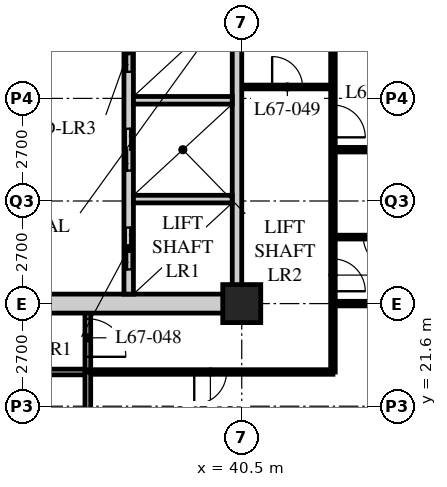
"""IFC4 building model, lengths in metres.
Left out: names, types, materials, properties, quantities, classifications, styles, units other than length and angle.
Written with IfcOpenShell. Run it as: python <this file> out.ifc"""

import sys

from ifc_helpers import new_model, si_unit, direction, frame, frame_2d, origin, origin_2d, place, context, subcontext, project, spatial, rectangle, hollow_rectangle, extrude, element, fill, save


model = new_model("IFC4")
c1 = context("Model", 3, precision=1e-05, world=origin(), true_north=direction((0.0, 1.0)))
c2 = subcontext(c1, "Body", "Model", "MODEL_VIEW")
j1 = project(units=[si_unit("LENGTHUNIT", "METRE"), si_unit("PLANEANGLEUNIT", "RADIAN")], contexts=[c1])
p1 = place(None, origin())
s1 = spatial("IfcSite", under=j1, at=p1, CompositionType="ELEMENT")
p2 = place(p1, origin())
s2 = spatial("IfcBuilding", under=s1, at=p2, CompositionType="ELEMENT")
p3 = place(p2, frame((0.0, 0.0, 261.9)))
s3 = spatial("IfcBuildingStorey", under=s2, at=p3, CompositionType="ELEMENT", Elevation=261.9)
p4 = place(p3, frame((40.5, 24.3, 0.0), z_axis=(0.0, 0.0, 1.0), x_axis=(1.0, 0.0, 0.0)))
e1 = element("IfcColumn", 1, at=p4, inside=s3, PredefinedType="COLUMN", context=c2, shape_type="SweptSolid", body=[
    extrude(hollow_rectangle(XDim=1.0, YDim=1.0, WallThickness=0.1, at=origin_2d()), origin(), (0.0, 0.0, 1.0), 3.9),
])
p5 = place(p3, frame((8.1, 22.5, 0.0), z_axis=(0.0, 0.0, 1.0), x_axis=(1.0, 0.0, 0.0)))
e2 = element("IfcWall", 2, at=p5, inside=s3, PredefinedType="PARTITIONING", context=c2, shape_type="SweptSolid", body=[
    extrude(rectangle(XDim=28.35, YDim=0.15, at=frame_2d((14.175, 0.0))), origin(), (0.0, 0.0, 1.0), 3.69),
])
p6 = place(p5, frame((4.45, 0.0, 0.0)))
e3 = element("IfcOpeningElement", 3, at=p6, cuts=e2, PredefinedType="OPENING", context=c2, shape_type="SweptSolid", body=[
    extrude(rectangle(XDim=1.0, YDim=2.1, at=frame_2d((0.5, 1.05))), frame((0.0, 0.085, 0.0), z_axis=(0.0, -1.0, 0.0), x_axis=(1.0, 0.0, 0.0)), (0.0, 0.0, 1.0), 0.17),
])
p7 = place(p5, frame((12.55, 0.0, 0.0)))
e4 = element("IfcOpeningElement", 4, at=p7, cuts=e2, PredefinedType="OPENING", context=c2, shape_type="SweptSolid", body=[
    extrude(rectangle(XDim=1.0, YDim=2.1, at=frame_2d((0.5, 1.05))), frame((0.0, 0.085, 0.0), z_axis=(0.0, -1.0, 0.0), x_axis=(1.0, 0.0, 0.0)), (0.0, 0.0, 1.0), 0.17),
])
p8 = place(p5, frame((20.65, 0.0, 0.0)))
e5 = element("IfcOpeningElement", 5, at=p8, cuts=e2, PredefinedType="OPENING", context=c2, shape_type="SweptSolid", body=[
    extrude(rectangle(XDim=1.0, YDim=2.1, at=frame_2d((0.5, 1.05))), frame((0.0, 0.085, 0.0), z_axis=(0.0, -1.0, 0.0), x_axis=(1.0, 0.0, 0.0)), (0.0, 0.0, 1.0), 0.17),
])
p9 = place(p5, frame((2.625, 0.0, 0.0)))
e6 = element("IfcOpeningElement", 6, at=p9, cuts=e2, PredefinedType="OPENING", context=c2, shape_type="SweptSolid", body=[
    extrude(rectangle(XDim=1.0, YDim=2.1, at=frame_2d((0.5, 1.05))), frame((0.0, 0.085, 0.0), z_axis=(0.0, -1.0, 0.0), x_axis=(1.0, 0.0, 0.0)), (0.0, 0.0, 1.0), 0.17),
])
p10 = place(p3, frame((36.45, 22.5, 0.0), z_axis=(0.0, 0.0, 1.0), x_axis=(0.0, 1.0, 0.0)))
e7 = element("IfcWall", 7, at=p10, inside=s3, PredefinedType="PARTITIONING", context=c2, shape_type="SweptSolid", body=[
    extrude(rectangle(XDim=1.8, YDim=0.15, at=frame_2d((0.9, 0.0))), origin(), (0.0, 0.0, 1.0), 3.69),
])
p11 = place(p10, frame((0.4, 0.0, 0.0)))
e8 = element("IfcOpeningElement", 8, at=p11, cuts=e7, PredefinedType="OPENING", context=c2, shape_type="SweptSolid", body=[
    extrude(rectangle(XDim=1.0, YDim=2.1, at=frame_2d((0.5, 1.05))), frame((0.0, 0.085, 0.0), z_axis=(0.0, -1.0, 0.0), x_axis=(1.0, 0.0, 0.0)), (0.0, 0.0, 1.0), 0.17),
])
p12 = place(p3, frame((40.5, 30.0, 0.0), z_axis=(0.0, 0.0, 1.0), x_axis=(1.0, 0.0, 0.0)))
e9 = element("IfcWall", 9, at=p12, inside=s3, PredefinedType="PARTITIONING", context=c2, shape_type="SweptSolid", body=[
    extrude(rectangle(XDim=2.4, YDim=0.1, at=frame_2d((1.2, 0.0))), origin(), (0.0, 0.0, 1.0), 3.69),
])
p13 = place(p12, frame((0.8, 0.0, 0.0)))
e10 = element("IfcOpeningElement", 10, at=p13, cuts=e9, PredefinedType="OPENING", context=c2, shape_type="SweptSolid", body=[
    extrude(rectangle(XDim=0.8, YDim=2.1, at=frame_2d((0.4, 1.05))), frame((0.0, 0.06, 0.0), z_axis=(0.0, -1.0, 0.0), x_axis=(1.0, 0.0, 0.0)), (0.0, 0.0, 1.0), 0.12),
])
p14 = place(p3, frame((42.9, 22.5, 0.0), z_axis=(0.0, 0.0, 1.0), x_axis=(0.0, 1.0, 0.0)))
e11 = element("IfcWall", 11, at=p14, inside=s3, PredefinedType="PARTITIONING", context=c2, shape_type="SweptSolid", body=[
    extrude(rectangle(XDim=9.9, YDim=0.12, at=frame_2d((4.95, 0.0))), origin(), (0.0, 0.0, 1.0), 3.69),
])
p15 = place(p14, frame((2.125, 0.0, 0.0)))
e12 = element("IfcOpeningElement", 12, at=p15, cuts=e11, PredefinedType="OPENING", context=c2, shape_type="SweptSolid", body=[
    extrude(rectangle(XDim=0.85, YDim=2.1, at=frame_2d((0.425, 1.05))), frame((0.0, 0.07, 0.0), z_axis=(0.0, -1.0, 0.0), x_axis=(1.0, 0.0, 0.0)), (0.0, 0.0, 1.0), 0.14),
])
p16 = place(p14, frame((6.175, 0.0, 0.0)))
e13 = element("IfcOpeningElement", 13, at=p16, cuts=e11, PredefinedType="OPENING", context=c2, shape_type="SweptSolid", body=[
    extrude(rectangle(XDim=0.85, YDim=2.1, at=frame_2d((0.425, 1.05))), frame((0.0, 0.07, 0.0), z_axis=(0.0, -1.0, 0.0), x_axis=(1.0, 0.0, 0.0)), (0.0, 0.0, 1.0), 0.14),
])
p17 = place(p3, frame((36.45, 22.5, 0.0), z_axis=(0.0, 0.0, 1.0), x_axis=(1.0, 0.0, 0.0)))
e14 = element("IfcWall", 14, at=p17, inside=s3, PredefinedType="PARTITIONING", context=c2, shape_type="SweptSolid", body=[
    extrude(rectangle(XDim=6.45, YDim=0.12, at=frame_2d((3.225, 0.0))), origin(), (0.0, 0.0, 1.0), 3.69),
])
p18 = place(p17, frame((2.8, 0.0, 0.0)))
e15 = element("IfcOpeningElement", 15, at=p18, cuts=e14, PredefinedType="OPENING", context=c2, shape_type="SweptSolid", body=[
    extrude(rectangle(XDim=0.85, YDim=2.1, at=frame_2d((0.425, 1.05))), frame((0.0, 0.07, 0.0), z_axis=(0.0, -1.0, 0.0), x_axis=(1.0, 0.0, 0.0)), (0.0, 0.0, 1.0), 0.14),
])
p19 = place(p3, frame((42.9, 24.3, 0.0), z_axis=(0.0, 0.0, 1.0), x_axis=(1.0, 0.0, 0.0)))
e16 = element("IfcWall", 16, at=p19, inside=s3, PredefinedType="PARTITIONING", context=c2, shape_type="SweptSolid", body=[
    extrude(rectangle(XDim=9.45, YDim=0.12, at=frame_2d((4.725, 0.0))), origin(), (0.0, 0.0, 1.0), 3.078),
])
p20 = place(p3, frame((36.45, 16.5, 0.0), z_axis=(0.0, 0.0, 1.0), x_axis=(0.0, 1.0, 0.0)))
e17 = element("IfcWall", 17, at=p20, inside=s3, PredefinedType="PARTITIONING", context=c2, shape_type="SweptSolid", body=[
    extrude(rectangle(XDim=6.0, YDim=0.15, at=frame_2d((3.0, 0.0))), origin(), (0.0, 0.0, 1.0), 3.69),
])
p21 = place(p3, frame((42.9, 26.05, 0.0), z_axis=(0.0, 0.0, 1.0), x_axis=(1.0, 0.0, 0.0)))
e18 = element("IfcWall", 18, at=p21, inside=s3, PredefinedType="PARTITIONING", context=c2, shape_type="SweptSolid", body=[
    extrude(rectangle(XDim=2.4, YDim=0.1, at=frame_2d((1.2, 0.0))), origin(), (0.0, 0.0, 1.0), 3.69),
])
p22 = place(p21, frame((0.8, 0.0, 0.0)))
e19 = element("IfcOpeningElement", 19, at=p22, cuts=e18, PredefinedType="OPENING", context=c2, shape_type="SweptSolid", body=[
    extrude(rectangle(XDim=0.8, YDim=2.1, at=frame_2d((0.4, 1.05))), frame((0.0, 0.06, 0.0), z_axis=(0.0, -1.0, 0.0), x_axis=(1.0, 0.0, 0.0)), (0.0, 0.0, 1.0), 0.12),
])
p23 = place(p3, frame((42.9, 28.35, 0.0), z_axis=(0.0, 0.0, 1.0), x_axis=(1.0, 0.0, 0.0)))
e20 = element("IfcWall", 20, at=p23, inside=s3, PredefinedType="PARTITIONING", context=c2, shape_type="SweptSolid", body=[
    extrude(rectangle(XDim=13.5, YDim=0.12, at=frame_2d((6.75, 0.0))), origin(), (0.0, 0.0, 1.0), 3.69),
])
p24 = place(p3, frame((15.95, 24.3, 0.0), z_axis=(0.0, 0.0, 1.0), x_axis=(1.0, 0.0, 0.0)))
e21 = element("IfcWall", 21, at=p24, inside=s3, PredefinedType="SOLIDWALL", context=c2, shape_type="SweptSolid", body=[
    extrude(rectangle(XDim=24.55, YDim=0.5, at=frame_2d((12.275, 0.0))), origin(), (0.0, 0.0, 1.0), 3.04),
])
p25 = place(p24, frame((11.5, 0.0, 0.0)))
e22 = element("IfcOpeningElement", 22, at=p25, cuts=e21, PredefinedType="OPENING", context=c2, shape_type="SweptSolid", body=[
    extrude(rectangle(XDim=1.8, YDim=2.4, at=frame_2d((0.9, 1.2))), frame((0.0, 0.26, 0.0), z_axis=(0.0, -1.0, 0.0), x_axis=(1.0, 0.0, 0.0)), (0.0, 0.0, 1.0), 0.52),
])
p26 = place(p3, frame((40.375, 24.55, 0.0), z_axis=(0.0, 0.0, 1.0), x_axis=(0.0, 1.0, 0.0)))
e23 = element("IfcWall", 23, at=p26, inside=s3, PredefinedType="SOLIDWALL", context=c2, shape_type="SweptSolid", body=[
    extrude(rectangle(XDim=15.7, YDim=0.25, at=frame_2d((7.85, 0.0))), origin(), (0.0, 0.0, 1.0), 3.078),
])
p27 = place(p3, frame((37.525, 24.55, 0.0), z_axis=(0.0, 0.0, 1.0), x_axis=(0.0, 1.0, 0.0)))
e24 = element("IfcWall", 24, at=p27, inside=s3, PredefinedType="SOLIDWALL", context=c2, shape_type="SweptSolid", body=[
    extrude(rectangle(XDim=7.75, YDim=0.25, at=frame_2d((3.875, 0.0))), origin(), (0.0, 0.0, 1.0), 3.69),
])
p28 = place(p27, frame((0.65, 0.0, 0.0)))
e25 = element("IfcOpeningElement", 25, at=p28, cuts=e24, PredefinedType="OPENING", context=c2, shape_type="SweptSolid", body=[
    extrude(rectangle(XDim=1.1, YDim=2.4, at=frame_2d((0.55, 1.2))), frame((0.0, 0.135, 0.0), z_axis=(0.0, -1.0, 0.0), x_axis=(1.0, 0.0, 0.0)), (0.0, 0.0, 1.0), 0.27),
])
p29 = place(p27, frame((3.25, 0.0, 0.0)))
e26 = element("IfcOpeningElement", 26, at=p29, cuts=e24, PredefinedType="OPENING", context=c2, shape_type="SweptSolid", body=[
    extrude(rectangle(XDim=1.1, YDim=2.4, at=frame_2d((0.55, 1.2))), frame((0.0, 0.135, 0.0), z_axis=(0.0, -1.0, 0.0), x_axis=(1.0, 0.0, 0.0)), (0.0, 0.0, 1.0), 0.27),
])
p30 = place(p27, frame((5.85, 0.0, 0.0)))
e27 = element("IfcOpeningElement", 27, at=p30, cuts=e24, PredefinedType="OPENING", context=c2, shape_type="SweptSolid", body=[
    extrude(rectangle(XDim=1.1, YDim=2.4, at=frame_2d((0.55, 1.2))), frame((0.0, 0.135, 0.0), z_axis=(0.0, -1.0, 0.0), x_axis=(1.0, 0.0, 0.0)), (0.0, 0.0, 1.0), 0.27),
])
for number, where, z_axis, x_axis in (
    (28, (37.65, 27.05, 0.0), (0.0, 0.0, 1.0), (1.0, 0.0, 0.0)),
    (29, (37.65, 29.65, 0.0), (0.0, 0.0, 1.0), (1.0, 0.0, 0.0)),
):
    element("IfcWall", number, at=place(p3, frame(where, z_axis=z_axis, x_axis=x_axis)), inside=s3, PredefinedType="SOLIDWALL", context=c2, shape_type="SweptSolid", body=[
        extrude(rectangle(XDim=2.6, YDim=0.2, at=frame_2d((1.3, 0.0))), origin(), (0.0, 0.0, 1.0), 3.69),
    ])
p31 = place(p11, origin())
e30 = element("IfcDoor", 30, at=p31, inside=s3, OperationType="SINGLE_SWING_RIGHT", PredefinedType="DOOR", context=c2, shape_type="SweptSolid", body=[
    extrude(rectangle(XDim=1.0, YDim=2.1, at=frame_2d((0.5, 1.05))), frame((0.0, 0.025, 0.0), z_axis=(0.0, -1.0, 0.0), x_axis=(1.0, 0.0, 0.0)), (0.0, 0.0, 1.0), 0.05),
])
fill(e8, e30)
p32 = place(p13, origin())
e31 = element("IfcDoor", 31, at=p32, inside=s3, OperationType="SINGLE_SWING_LEFT", PredefinedType="DOOR", context=c2, shape_type="SweptSolid", body=[
    extrude(rectangle(XDim=0.8, YDim=2.1, at=frame_2d((0.4, 1.05))), frame((0.0, 0.025, 0.0), z_axis=(0.0, -1.0, 0.0), x_axis=(1.0, 0.0, 0.0)), (0.0, 0.0, 1.0), 0.05),
])
fill(e10, e31)
p33 = place(p18, origin())
e32 = element("IfcDoor", 32, at=p33, inside=s3, OperationType="SINGLE_SWING_RIGHT", PredefinedType="DOOR", context=c2, shape_type="SweptSolid", body=[
    extrude(rectangle(XDim=0.85, YDim=2.1, at=frame_2d((0.425, 1.05))), frame((0.0, 0.025, 0.0), z_axis=(0.0, -1.0, 0.0), x_axis=(1.0, 0.0, 0.0)), (0.0, 0.0, 1.0), 0.05),
])
fill(e15, e32)
p34 = place(p22, origin())
e33 = element("IfcDoor", 33, at=p34, inside=s3, OperationType="SINGLE_SWING_LEFT", PredefinedType="DOOR", context=c2, shape_type="SweptSolid", body=[
    extrude(rectangle(XDim=0.8, YDim=2.1, at=frame_2d((0.4, 1.05))), frame((0.0, 0.025, 0.0), z_axis=(0.0, -1.0, 0.0), x_axis=(1.0, 0.0, 0.0)), (0.0, 0.0, 1.0), 0.05),
])
fill(e19, e33)
p35 = place(p15, origin())
e34 = element("IfcDoor", 34, at=p35, inside=s3, OperationType="SINGLE_SWING_RIGHT", PredefinedType="DOOR", context=c2, shape_type="SweptSolid", body=[
    extrude(rectangle(XDim=0.85, YDim=2.1, at=frame_2d((0.425, 1.05))), frame((0.0, 0.025, 0.0), z_axis=(0.0, -1.0, 0.0), x_axis=(1.0, 0.0, 0.0)), (0.0, 0.0, 1.0), 0.05),
])
fill(e12, e34)
p36 = place(p16, origin())
e35 = element("IfcDoor", 35, at=p36, inside=s3, OperationType="SINGLE_SWING_RIGHT", PredefinedType="DOOR", context=c2, shape_type="SweptSolid", body=[
    extrude(rectangle(XDim=0.85, YDim=2.1, at=frame_2d((0.425, 1.05))), frame((0.0, 0.025, 0.0), z_axis=(0.0, -1.0, 0.0), x_axis=(1.0, 0.0, 0.0)), (0.0, 0.0, 1.0), 0.05),
])
fill(e13, e35)
p37 = place(p28, origin())
e36 = element("IfcDoor", 36, at=p37, inside=s3, OperationType="DOUBLE_DOOR_SLIDING", PredefinedType="DOOR", context=c2, shape_type="SweptSolid", body=[
    extrude(rectangle(XDim=1.1, YDim=2.4, at=frame_2d((0.55, 1.2))), frame((0.0, 0.025, 0.0), z_axis=(0.0, -1.0, 0.0), x_axis=(1.0, 0.0, 0.0)), (0.0, 0.0, 1.0), 0.05),
])
fill(e25, e36)
p38 = place(p29, origin())
e37 = element("IfcDoor", 37, at=p38, inside=s3, OperationType="DOUBLE_DOOR_SLIDING", PredefinedType="DOOR", context=c2, shape_type="SweptSolid", body=[
    extrude(rectangle(XDim=1.1, YDim=2.4, at=frame_2d((0.55, 1.2))), frame((0.0, 0.025, 0.0), z_axis=(0.0, -1.0, 0.0), x_axis=(1.0, 0.0, 0.0)), (0.0, 0.0, 1.0), 0.05),
])
fill(e26, e37)
p39 = place(p30, origin())
e38 = element("IfcDoor", 38, at=p39, inside=s3, OperationType="DOUBLE_DOOR_SLIDING", PredefinedType="DOOR", context=c2, shape_type="SweptSolid", body=[
    extrude(rectangle(XDim=1.1, YDim=2.4, at=frame_2d((0.55, 1.2))), frame((0.0, 0.025, 0.0), z_axis=(0.0, -1.0, 0.0), x_axis=(1.0, 0.0, 0.0)), (0.0, 0.0, 1.0), 0.05),
])
fill(e27, e38)
save(model, sys.argv[1])
